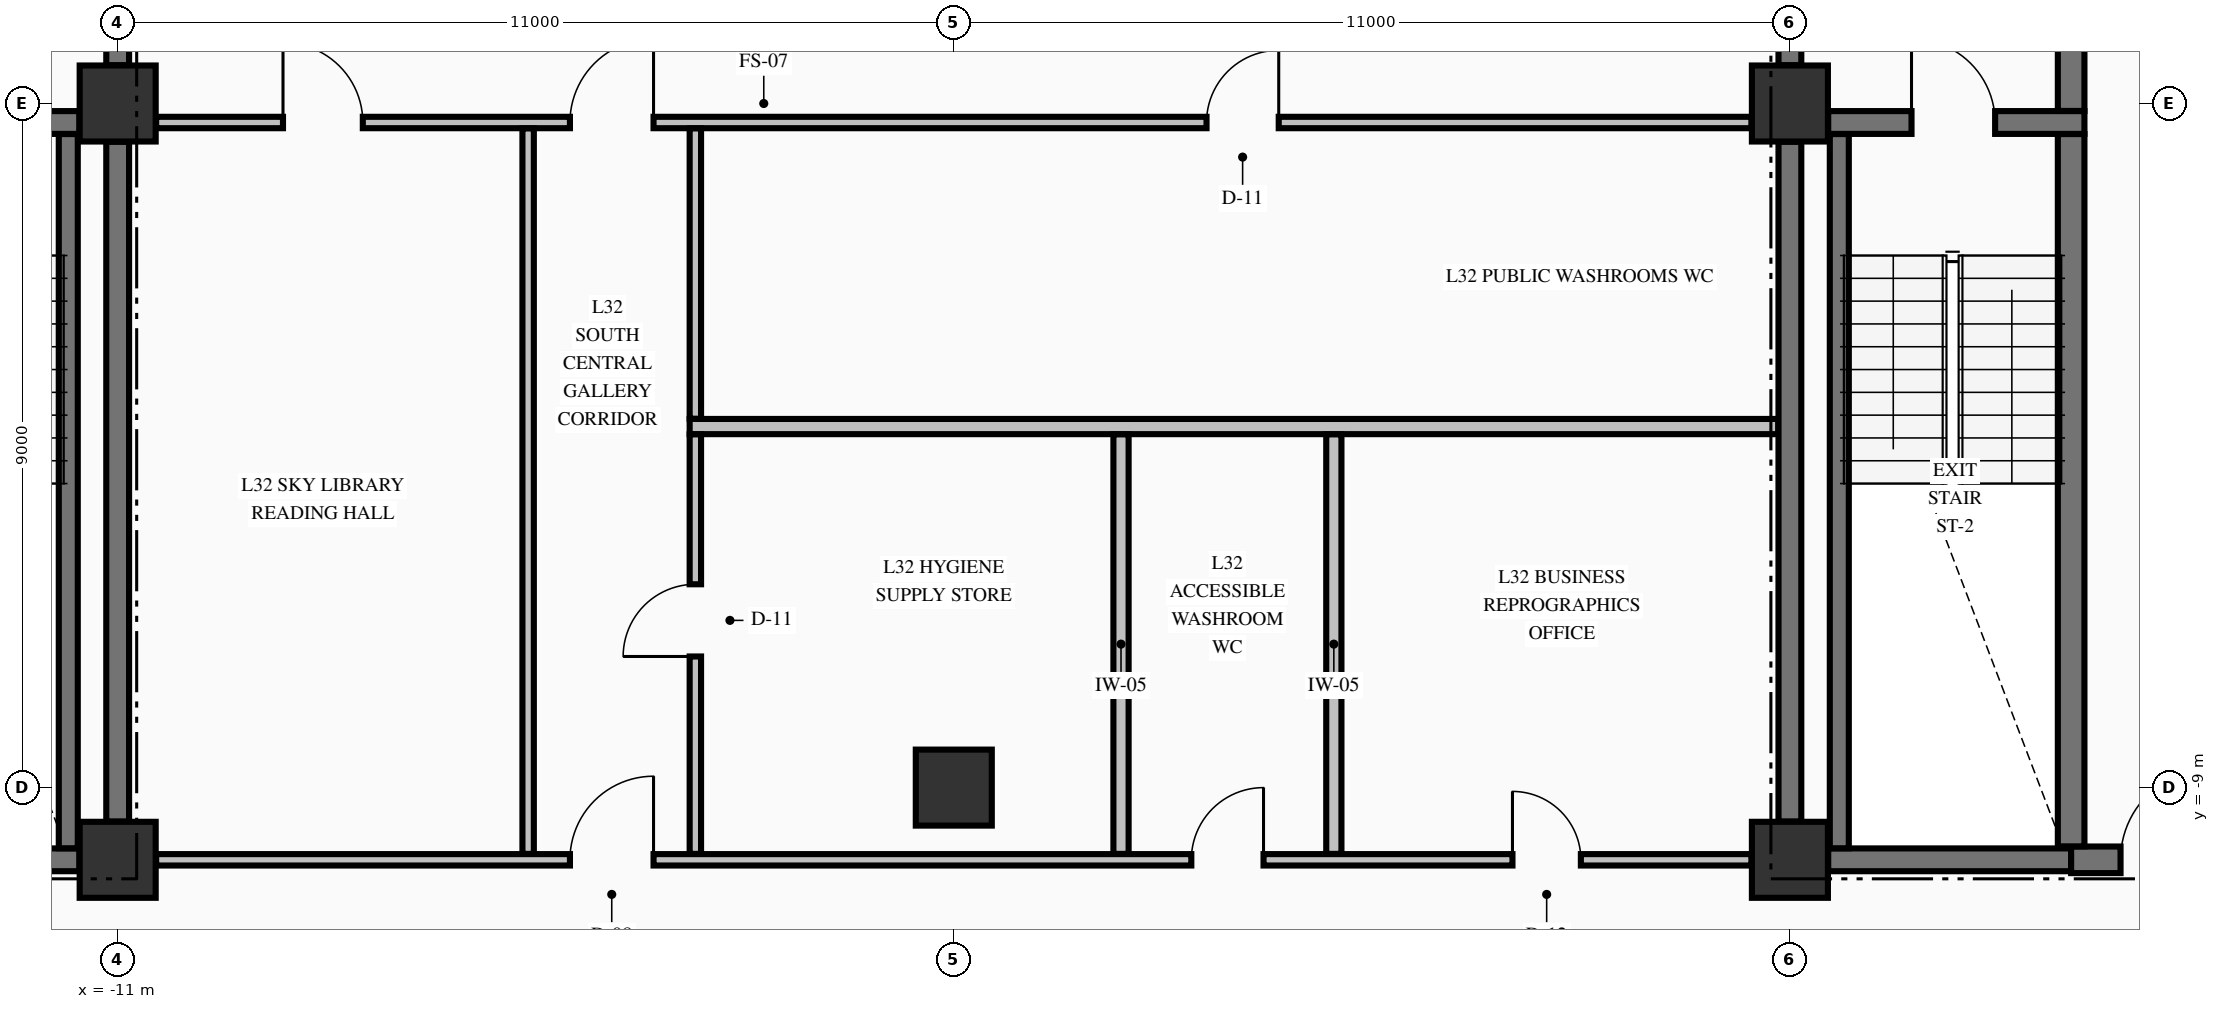
"""IFC4 building model, lengths in metres.
Left out: names, types, materials, properties, quantities, classifications, styles, units other than length and angle.
Written with IfcOpenShell. Run it as: python <this file> out.ifc"""

import sys

from ifc_helpers import new_model, si_unit, direction, frame, frame_2d, origin, origin_2d, place, context, subcontext, project, spatial, rectangle, extrude, element, fill, save


model = new_model("IFC4")
c1 = context("Model", 3, precision=1e-05, world=origin(), true_north=direction((0.0, 1.0)))
c2 = subcontext(c1, "Body", "Model", "MODEL_VIEW")
j1 = project(units=[si_unit("LENGTHUNIT", "METRE"), si_unit("PLANEANGLEUNIT", "RADIAN")], contexts=[c1])
p1 = place(None, origin())
s1 = spatial("IfcSite", under=j1, at=p1, CompositionType="ELEMENT")
p2 = place(p1, origin())
s2 = spatial("IfcBuilding", under=s1, at=p2, CompositionType="ELEMENT")
p3 = place(p2, frame((0.0, 0.0, 128.49)))
s3 = spatial("IfcBuildingStorey", under=s2, at=p3, CompositionType="ELEMENT", Elevation=128.49)
for number, where, z_axis, x_axis in (
    (1, (-11.0, -9.95, -0.25), (0.0, 0.0, 1.0), (1.0, 0.0, 0.0)),
    (2, (-11.0, 0.0, -0.25), (0.0, 0.0, 1.0), (1.0, 0.0, 0.0)),
    (3, (11.0, -9.95, -0.25), (0.0, 0.0, 1.0), (1.0, 0.0, 0.0)),
    (4, (11.0, 0.0, -0.25), (0.0, 0.0, 1.0), (1.0, 0.0, 0.0)),
    (5, (0.0, -9.0, -0.25), (0.0, 0.0, 1.0), (1.0, 0.0, 0.0)),
):
    element("IfcColumn", number, at=place(p3, frame(where, z_axis=z_axis, x_axis=x_axis)), inside=s3, PredefinedType="COLUMN", context=c2, shape_type="SweptSolid", body=[
        extrude(rectangle(XDim=1.0, YDim=1.0, at=origin_2d()), origin(), (0.0, 0.0, 1.0), 3.57),
    ])
for number, where, z_axis, x_axis in (
    (6, (-14.7, -9.95, 0.0), (0.0, 0.0, 1.0), (1.0, 0.0, 0.0)),
    (7, (11.504, -9.95, 0.0), (0.0, 0.0, 1.0), (1.0, 0.0, 0.0)),
):
    element("IfcWall", number, at=place(p3, frame(where, z_axis=z_axis, x_axis=x_axis)), inside=s3, PredefinedType="SHEAR", context=c2, shape_type="SweptSolid", body=[
        extrude(rectangle(XDim=3.196, YDim=0.3, at=frame_2d((1.598, 0.0))), origin(), (0.0, 0.0, 1.0), 3.32),
    ])
p4 = place(p3, frame((14.7, -9.95, 0.0), z_axis=(0.0, 0.0, 1.0), x_axis=(1.0, 0.0, 0.0)))
e8 = element("IfcWall", 8, at=p4, inside=s3, PredefinedType="SHEAR", context=c2, shape_type="SweptSolid", body=[
    extrude(rectangle(XDim=4.796, YDim=0.35, at=frame_2d((2.398, 0.0))), origin(), (0.0, 0.0, 1.0), 3.32),
])
p5 = place(p4, frame((0.65, 0.0, 0.0)))
e9 = element("IfcOpeningElement", 9, at=p5, cuts=e8, PredefinedType="OPENING", context=c2, shape_type="SweptSolid", body=[
    extrude(rectangle(XDim=1.2, YDim=2.15, at=frame_2d((0.6, 1.075))), frame((0.0, 0.185, 0.0), z_axis=(0.0, -1.0, 0.0), x_axis=(1.0, 0.0, 0.0)), (0.0, 0.0, 1.0), 0.37),
])
p6 = place(p3, frame((-19.496, -0.25, 0.0), z_axis=(0.0, 0.0, 1.0), x_axis=(1.0, 0.0, 0.0)))
e10 = element("IfcWall", 10, at=p6, inside=s3, PredefinedType="SHEAR", context=c2, shape_type="SweptSolid", body=[
    extrude(rectangle(XDim=7.992, YDim=0.3, at=frame_2d((3.996, 0.0))), origin(), (0.0, 0.0, 1.0), 3.32),
])
p7 = place(p6, frame((5.796, 0.0, 0.0)))
e11 = element("IfcOpeningElement", 11, at=p7, cuts=e10, PredefinedType="OPENING", context=c2, shape_type="SweptSolid", body=[
    extrude(rectangle(XDim=1.1, YDim=2.15, at=frame_2d((0.55, 1.075))), frame((0.0, 0.16, 0.0), z_axis=(0.0, -1.0, 0.0), x_axis=(1.0, 0.0, 0.0)), (0.0, 0.0, 1.0), 0.32),
])
p8 = place(p3, frame((11.504, -0.25, 0.0), z_axis=(0.0, 0.0, 1.0), x_axis=(1.0, 0.0, 0.0)))
e12 = element("IfcWall", 12, at=p8, inside=s3, PredefinedType="SHEAR", context=c2, shape_type="SweptSolid", body=[
    extrude(rectangle(XDim=3.371, YDim=0.3, at=frame_2d((1.686, 0.0))), origin(), (0.0, 0.0, 1.0), 3.32),
])
p9 = place(p8, frame((1.096, 0.0, 0.0)))
e13 = element("IfcOpeningElement", 13, at=p9, cuts=e12, PredefinedType="OPENING", context=c2, shape_type="SweptSolid", body=[
    extrude(rectangle(XDim=1.1, YDim=2.15, at=frame_2d((0.55, 1.075))), frame((0.0, 0.16, 0.0), z_axis=(0.0, -1.0, 0.0), x_axis=(1.0, 0.0, 0.0)), (0.0, 0.0, 1.0), 0.32),
])
p10 = place(p3, frame((-10.494, -9.95, 0.0), z_axis=(0.0, 0.0, 1.0), x_axis=(1.0, 0.0, 0.0)))
e14 = element("IfcWall", 14, at=p10, inside=s3, PredefinedType="PARTITIONING", context=c2, shape_type="SweptSolid", body=[
    extrude(rectangle(XDim=20.988, YDim=0.15, at=frame_2d((10.494, 0.0))), origin(), (0.0, 0.0, 1.0), 3.32),
])
p11 = place(p10, frame((5.444, 0.0, 0.0)))
e15 = element("IfcOpeningElement", 15, at=p11, cuts=e14, PredefinedType="OPENING", context=c2, shape_type="SweptSolid", body=[
    extrude(rectangle(XDim=1.1, YDim=2.15, at=frame_2d((0.55, 1.075))), frame((0.0, 0.085, 0.0), z_axis=(0.0, -1.0, 0.0), x_axis=(1.0, 0.0, 0.0)), (0.0, 0.0, 1.0), 0.17),
])
p12 = place(p10, frame((13.619, 0.0, 0.0)))
e16 = element("IfcOpeningElement", 16, at=p12, cuts=e14, PredefinedType="OPENING", context=c2, shape_type="SweptSolid", body=[
    extrude(rectangle(XDim=0.95, YDim=2.15, at=frame_2d((0.475, 1.075))), frame((0.0, 0.085, 0.0), z_axis=(0.0, -1.0, 0.0), x_axis=(1.0, 0.0, 0.0)), (0.0, 0.0, 1.0), 0.17),
])
p13 = place(p10, frame((17.844, 0.0, 0.0)))
e17 = element("IfcOpeningElement", 17, at=p13, cuts=e14, PredefinedType="OPENING", context=c2, shape_type="SweptSolid", body=[
    extrude(rectangle(XDim=0.9, YDim=2.15, at=frame_2d((0.45, 1.075))), frame((0.0, 0.085, 0.0), z_axis=(0.0, -1.0, 0.0), x_axis=(1.0, 0.0, 0.0)), (0.0, 0.0, 1.0), 0.17),
])
p14 = place(p3, frame((-3.475, -4.25, 0.0), z_axis=(0.0, 0.0, 1.0), x_axis=(1.0, 0.0, 0.0)))
e18 = element("IfcWall", 18, at=p14, inside=s3, PredefinedType="PARTITIONING", context=c2, shape_type="SweptSolid", body=[
    extrude(rectangle(XDim=14.322, YDim=0.2, at=frame_2d((7.161, 0.0))), origin(), (0.0, 0.0, 1.0), 3.32),
])
p15 = place(p3, frame((-10.494, -0.25, 0.0), z_axis=(0.0, 0.0, 1.0), x_axis=(1.0, 0.0, 0.0)))
e19 = element("IfcWall", 19, at=p15, inside=s3, PredefinedType="PARTITIONING", context=c2, shape_type="SweptSolid", body=[
    extrude(rectangle(XDim=20.988, YDim=0.15, at=frame_2d((10.494, 0.0))), origin(), (0.0, 0.0, 1.0), 3.32),
])
p16 = place(p15, frame((5.444, 0.0, 0.0)))
e20 = element("IfcOpeningElement", 20, at=p16, cuts=e19, PredefinedType="OPENING", context=c2, shape_type="SweptSolid", body=[
    extrude(rectangle(XDim=1.1, YDim=2.15, at=frame_2d((0.55, 1.075))), frame((0.0, 0.085, 0.0), z_axis=(0.0, -1.0, 0.0), x_axis=(1.0, 0.0, 0.0)), (0.0, 0.0, 1.0), 0.17),
])
p17 = place(p15, frame((1.669, 0.0, 0.0)))
e21 = element("IfcOpeningElement", 21, at=p17, cuts=e19, PredefinedType="OPENING", context=c2, shape_type="SweptSolid", body=[
    extrude(rectangle(XDim=1.05, YDim=2.15, at=frame_2d((0.525, 1.075))), frame((0.0, 0.085, 0.0), z_axis=(0.0, -1.0, 0.0), x_axis=(1.0, 0.0, 0.0)), (0.0, 0.0, 1.0), 0.17),
])
p18 = place(p15, frame((13.819, 0.0, 0.0)))
e22 = element("IfcOpeningElement", 22, at=p18, cuts=e19, PredefinedType="OPENING", context=c2, shape_type="SweptSolid", body=[
    extrude(rectangle(XDim=0.95, YDim=2.15, at=frame_2d((0.475, 1.075))), frame((0.0, 0.085, 0.0), z_axis=(0.0, -1.0, 0.0), x_axis=(1.0, 0.0, 0.0)), (0.0, 0.0, 1.0), 0.17),
])
p19 = place(p3, frame((-11.65, -9.798, 0.0), z_axis=(0.0, 0.0, 1.0), x_axis=(0.0, 1.0, 0.0)))
e23 = element("IfcWall", 23, at=p19, inside=s3, PredefinedType="SOLIDWALL", context=c2, shape_type="SweptSolid", body=[
    extrude(rectangle(XDim=9.396, YDim=0.25, at=frame_2d((4.698, 0.0))), origin(), (0.0, 0.0, 1.0), 3.32),
])
p20 = place(p3, frame((-11.0, -9.446, 0.0), z_axis=(0.0, 0.0, 1.0), x_axis=(0.0, 1.0, 0.0)))
e24 = element("IfcWall", 24, at=p20, inside=s3, PredefinedType="SHEAR", context=c2, shape_type="SweptSolid", body=[
    extrude(rectangle(XDim=8.942, YDim=0.3, at=frame_2d((4.471, 0.0))), origin(), (0.0, 0.0, 1.0), 3.32),
])
p21 = place(p3, frame((-11.0, 0.504, 0.0), z_axis=(0.0, 0.0, 1.0), x_axis=(0.0, 1.0, 0.0)))
e25 = element("IfcWall", 25, at=p21, inside=s3, PredefinedType="SHEAR", context=c2, shape_type="SweptSolid", body=[
    extrude(rectangle(XDim=2.244, YDim=0.3, at=frame_2d((1.122, 0.0))), origin(), (0.0, 0.0, 1.0), 3.32),
])
p22 = place(p21, frame((0.596, 0.0, 0.0)))
e26 = element("IfcOpeningElement", 26, at=p22, cuts=e25, PredefinedType="OPENING", context=c2, shape_type="SweptSolid", body=[
    extrude(rectangle(XDim=1.1, YDim=2.15, at=frame_2d((0.55, 1.075))), frame((0.0, 0.16, 0.0), z_axis=(0.0, -1.0, 0.0), x_axis=(1.0, 0.0, 0.0)), (0.0, 0.0, 1.0), 0.32),
])
p23 = place(p3, frame((11.0, -9.446, 0.0), z_axis=(0.0, 0.0, 1.0), x_axis=(0.0, 1.0, 0.0)))
e27 = element("IfcWall", 27, at=p23, inside=s3, PredefinedType="SHEAR", context=c2, shape_type="SweptSolid", body=[
    extrude(rectangle(XDim=8.942, YDim=0.3, at=frame_2d((4.471, 0.0))), origin(), (0.0, 0.0, 1.0), 3.32),
])
p24 = place(p3, frame((11.0, 0.504, 0.0), z_axis=(0.0, 0.0, 1.0), x_axis=(0.0, 1.0, 0.0)))
e28 = element("IfcWall", 28, at=p24, inside=s3, PredefinedType="SHEAR", context=c2, shape_type="SweptSolid", body=[
    extrude(rectangle(XDim=2.244, YDim=0.3, at=frame_2d((1.122, 0.0))), origin(), (0.0, 0.0, 1.0), 3.32),
])
p25 = place(p24, frame((0.596, 0.0, 0.0)))
e29 = element("IfcOpeningElement", 29, at=p25, cuts=e28, PredefinedType="OPENING", context=c2, shape_type="SweptSolid", body=[
    extrude(rectangle(XDim=1.1, YDim=2.15, at=frame_2d((0.55, 1.075))), frame((0.0, 0.16, 0.0), z_axis=(0.0, -1.0, 0.0), x_axis=(1.0, 0.0, 0.0)), (0.0, 0.0, 1.0), 0.32),
])
p26 = place(p3, frame((11.65, -9.798, 0.0), z_axis=(0.0, 0.0, 1.0), x_axis=(0.0, 1.0, 0.0)))
e30 = element("IfcWall", 30, at=p26, inside=s3, PredefinedType="SOLIDWALL", context=c2, shape_type="SweptSolid", body=[
    extrude(rectangle(XDim=9.396, YDim=0.25, at=frame_2d((4.698, 0.0))), origin(), (0.0, 0.0, 1.0), 3.32),
])
p27 = place(p3, frame((14.7, -9.773, 0.0), z_axis=(0.0, 0.0, 1.0), x_axis=(0.0, 1.0, 0.0)))
e31 = element("IfcWall", 31, at=p27, inside=s3, PredefinedType="SHEAR", context=c2, shape_type="SweptSolid", body=[
    extrude(rectangle(XDim=9.371, YDim=0.35, at=frame_2d((4.686, 0.0))), origin(), (0.0, 0.0, 1.0), 3.32),
])
p28 = place(p3, frame((14.7, -0.098, 0.0), z_axis=(0.0, 0.0, 1.0), x_axis=(0.0, 1.0, 0.0)))
e32 = element("IfcWall", 32, at=p28, inside=s3, PredefinedType="SHEAR", context=c2, shape_type="SweptSolid", body=[
    extrude(rectangle(XDim=2.846, YDim=0.35, at=frame_2d((1.423, 0.0))), origin(), (0.0, 0.0, 1.0), 3.32),
])
p29 = place(p3, frame((-5.6, -9.872, 0.0), z_axis=(0.0, 0.0, 1.0), x_axis=(0.0, 1.0, 0.0)))
e33 = element("IfcWall", 33, at=p29, inside=s3, PredefinedType="PARTITIONING", context=c2, shape_type="SweptSolid", body=[
    extrude(rectangle(XDim=9.544, YDim=0.15, at=frame_2d((4.772, 0.0))), origin(), (0.0, 0.0, 1.0), 3.32),
])
p30 = place(p3, frame((-3.4, -9.872, 0.0), z_axis=(0.0, 0.0, 1.0), x_axis=(0.0, 1.0, 0.0)))
e34 = element("IfcWall", 34, at=p30, inside=s3, PredefinedType="PARTITIONING", context=c2, shape_type="SweptSolid", body=[
    extrude(rectangle(XDim=5.519, YDim=0.15, at=frame_2d((2.76, 0.0))), origin(), (0.0, 0.0, 1.0), 3.32),
])
p31 = place(p30, frame((2.597, 0.0, 0.0)))
e35 = element("IfcOpeningElement", 35, at=p31, cuts=e34, PredefinedType="OPENING", context=c2, shape_type="SweptSolid", body=[
    extrude(rectangle(XDim=0.95, YDim=2.15, at=frame_2d((0.475, 1.075))), frame((0.0, 0.085, 0.0), z_axis=(0.0, -1.0, 0.0), x_axis=(1.0, 0.0, 0.0)), (0.0, 0.0, 1.0), 0.17),
])
p32 = place(p3, frame((-3.4, -4.147, 0.0), z_axis=(0.0, 0.0, 1.0), x_axis=(0.0, 1.0, 0.0)))
e36 = element("IfcWall", 36, at=p32, inside=s3, PredefinedType="PARTITIONING", context=c2, shape_type="SweptSolid", body=[
    extrude(rectangle(XDim=3.819, YDim=0.15, at=frame_2d((1.91, 0.0))), origin(), (0.0, 0.0, 1.0), 3.32),
])
for number, where, z_axis, x_axis in (
    (37, (2.2, -9.872, 0.0), (0.0, 0.0, 1.0), (0.0, 1.0, 0.0)),
    (38, (5.0, -9.872, 0.0), (0.0, 0.0, 1.0), (0.0, 1.0, 0.0)),
):
    element("IfcWall", number, at=place(p3, frame(where, z_axis=z_axis, x_axis=x_axis)), inside=s3, PredefinedType="PARTITIONING", context=c2, shape_type="SweptSolid", body=[
        extrude(rectangle(XDim=5.519, YDim=0.2, at=frame_2d((2.76, 0.0))), origin(), (0.0, 0.0, 1.0), 3.32),
    ])
p33 = place(p9, origin())
e39 = element("IfcDoor", 39, at=p33, inside=s3, OperationType="SINGLE_SWING_LEFT", PredefinedType="DOOR", context=c2, shape_type="SweptSolid", body=[
    extrude(rectangle(XDim=1.1, YDim=2.15, at=frame_2d((0.55, 1.075))), frame((0.0, 0.025, 0.0), z_axis=(0.0, -1.0, 0.0), x_axis=(1.0, 0.0, 0.0)), (0.0, 0.0, 1.0), 0.05),
])
fill(e13, e39)
p34 = place(p5, origin())
e40 = element("IfcDoor", 40, at=p34, inside=s3, OperationType="SINGLE_SWING_RIGHT", PredefinedType="DOOR", context=c2, shape_type="SweptSolid", body=[
    extrude(rectangle(XDim=1.2, YDim=2.15, at=frame_2d((0.6, 1.075))), frame((0.0, 0.025, 0.0), z_axis=(0.0, -1.0, 0.0), x_axis=(1.0, 0.0, 0.0)), (0.0, 0.0, 1.0), 0.05),
])
fill(e9, e40)
p35 = place(p11, origin())
e41 = element("IfcDoor", 41, at=p35, inside=s3, OperationType="SINGLE_SWING_RIGHT", PredefinedType="DOOR", context=c2, shape_type="SweptSolid", body=[
    extrude(rectangle(XDim=1.1, YDim=2.15, at=frame_2d((0.55, 1.075))), frame((0.0, 0.025, 0.0), z_axis=(0.0, -1.0, 0.0), x_axis=(1.0, 0.0, 0.0)), (0.0, 0.0, 1.0), 0.05),
])
fill(e15, e41)
p36 = place(p16, origin())
e42 = element("IfcDoor", 42, at=p36, inside=s3, OperationType="SINGLE_SWING_RIGHT", PredefinedType="DOOR", context=c2, shape_type="SweptSolid", body=[
    extrude(rectangle(XDim=1.1, YDim=2.15, at=frame_2d((0.55, 1.075))), frame((0.0, 0.025, 0.0), z_axis=(0.0, -1.0, 0.0), x_axis=(1.0, 0.0, 0.0)), (0.0, 0.0, 1.0), 0.05),
])
fill(e20, e42)
p37 = place(p17, origin())
e43 = element("IfcDoor", 43, at=p37, inside=s3, OperationType="SINGLE_SWING_LEFT", PredefinedType="DOOR", context=c2, shape_type="SweptSolid", body=[
    extrude(rectangle(XDim=1.05, YDim=2.15, at=frame_2d((0.525, 1.075))), frame((0.0, 0.025, 0.0), z_axis=(0.0, -1.0, 0.0), x_axis=(1.0, 0.0, 0.0)), (0.0, 0.0, 1.0), 0.05),
])
fill(e21, e43)
p38 = place(p18, origin())
e44 = element("IfcDoor", 44, at=p38, inside=s3, OperationType="SINGLE_SWING_RIGHT", PredefinedType="DOOR", context=c2, shape_type="SweptSolid", body=[
    extrude(rectangle(XDim=0.95, YDim=2.15, at=frame_2d((0.475, 1.075))), frame((0.0, 0.025, 0.0), z_axis=(0.0, -1.0, 0.0), x_axis=(1.0, 0.0, 0.0)), (0.0, 0.0, 1.0), 0.05),
])
fill(e22, e44)
p39 = place(p31, origin())
e45 = element("IfcDoor", 45, at=p39, inside=s3, OperationType="SINGLE_SWING_LEFT", PredefinedType="DOOR", context=c2, shape_type="SweptSolid", body=[
    extrude(rectangle(XDim=0.95, YDim=2.15, at=frame_2d((0.475, 1.075))), frame((0.0, 0.025, 0.0), z_axis=(0.0, -1.0, 0.0), x_axis=(1.0, 0.0, 0.0)), (0.0, 0.0, 1.0), 0.05),
])
fill(e35, e45)
p40 = place(p12, origin())
e46 = element("IfcDoor", 46, at=p40, inside=s3, OperationType="SINGLE_SWING_RIGHT", PredefinedType="DOOR", context=c2, shape_type="SweptSolid", body=[
    extrude(rectangle(XDim=0.95, YDim=2.15, at=frame_2d((0.475, 1.075))), frame((0.0, 0.025, 0.0), z_axis=(0.0, -1.0, 0.0), x_axis=(1.0, 0.0, 0.0)), (0.0, 0.0, 1.0), 0.05),
])
fill(e16, e46)
p41 = place(p13, origin())
e47 = element("IfcDoor", 47, at=p41, inside=s3, OperationType="SINGLE_SWING_LEFT", PredefinedType="DOOR", context=c2, shape_type="SweptSolid", body=[
    extrude(rectangle(XDim=0.9, YDim=2.15, at=frame_2d((0.45, 1.075))), frame((0.0, 0.025, 0.0), z_axis=(0.0, -1.0, 0.0), x_axis=(1.0, 0.0, 0.0)), (0.0, 0.0, 1.0), 0.05),
])
fill(e17, e47)
save(model, sys.argv[1])
